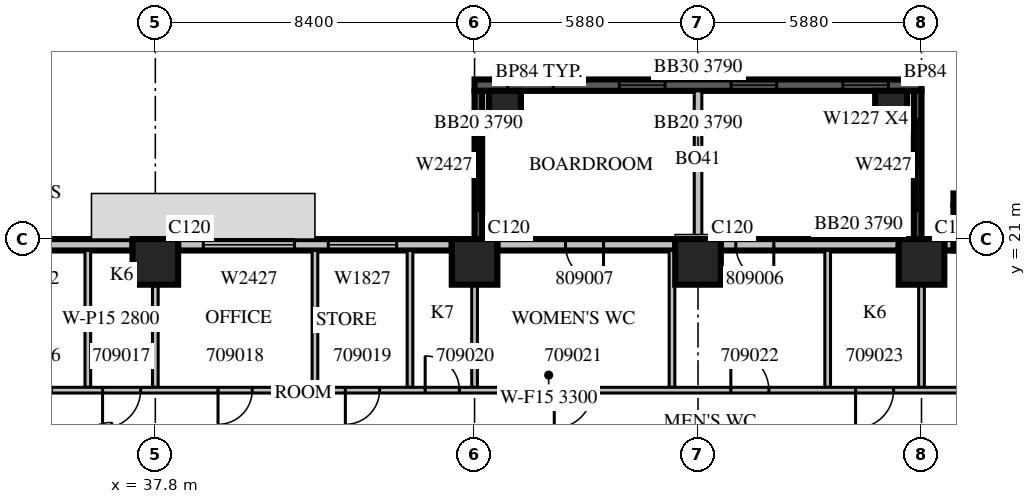
"""IFC4 building model, lengths in metres.
Left out: names, types, materials, properties, quantities, classifications, styles, units other than length and angle.
Written with IfcOpenShell. Run it as: python <this file> out.ifc"""

import sys

from ifc_helpers import new_model, si_unit, direction, frame, frame_2d, origin, origin_2d, place, context, subcontext, project, spatial, rectangle, extrude, source, transform, mapped, element, fill, save


model = new_model("IFC4")
c1 = context("Model", 3, precision=1e-05, world=origin(), true_north=direction((0.0, 1.0)))
c2 = subcontext(c1, "Body", "Model", "MODEL_VIEW")
j1 = project(units=[si_unit("LENGTHUNIT", "METRE"), si_unit("PLANEANGLEUNIT", "RADIAN")], contexts=[c1])
p1 = place(None, origin())
s1 = spatial("IfcSite", under=j1, at=p1, CompositionType="ELEMENT")
p2 = place(p1, origin())
s2 = spatial("IfcBuilding", under=s1, at=p2, CompositionType="ELEMENT")
p3 = place(p2, frame((0.0, 0.0, 48.9)))
s3 = spatial("IfcBuildingStorey", under=s2, at=p3, CompositionType="ELEMENT", Elevation=48.9)
m1 = source(origin(), c2, "Body", "SweptSolid", [
    extrude(rectangle(XDim=1.2, YDim=1.2, at=origin_2d()), origin(), (0.0, 0.0, 1.0), 4.2),
])
for number, where, z_axis, x_axis in (
    (1, (37.8, 20.4, 0.0), (0.0, 0.0, 1.0), (1.0, 0.0, 0.0)),
    (2, (46.2, 20.4, 0.0), (0.0, 0.0, 1.0), (1.0, 0.0, 0.0)),
    (3, (52.08, 20.4, 0.0), (0.0, 0.0, 1.0), (1.0, 0.0, 0.0)),
    (4, (57.96, 20.4, 0.0), (0.0, 0.0, 1.0), (1.0, 0.0, 0.0)),
):
    element("IfcColumn", number, at=place(p3, frame(where, z_axis=z_axis, x_axis=x_axis)), inside=s3, PredefinedType="COLUMN", context=c2, shape_type="MappedRepresentation", body=[
        mapped(m1, transform((0.0, 0.0, 0.0), scale=1.0)),
    ])
p4 = place(p3, frame((47.0, 24.48, -0.4), z_axis=(0.0, 0.0, 1.0), x_axis=(1.0, 0.0, 0.0)))
e5 = element("IfcColumn", 5, at=p4, inside=s3, PredefinedType="COLUMN", context=c2, shape_type="SweptSolid", body=[
    extrude(rectangle(XDim=0.84, YDim=0.84, at=origin_2d()), origin(), (0.0, 0.0, 1.0), 4.6),
])
m2 = source(origin(), c2, "Body", "SweptSolid", [
    extrude(rectangle(XDim=0.84, YDim=0.84, at=origin_2d()), origin(), (0.0, 0.0, 1.0), 4.6),
])
p5 = place(p3, frame((57.16, 24.48, -0.4), z_axis=(0.0, 0.0, 1.0), x_axis=(1.0, 0.0, 0.0)))
e6 = element("IfcColumn", 6, at=p5, inside=s3, PredefinedType="COLUMN", context=c2, shape_type="MappedRepresentation", body=[
    mapped(m2, transform((0.0, 0.0, 0.0), scale=1.0)),
])
m3 = source(origin(), c2, "Body", "SweptSolid", [
    extrude(rectangle(XDim=4.2, YDim=0.3, at=frame_2d((2.1, 0.0))), origin(), (0.0, 0.0, 1.0), 3.8),
])
p6 = place(p3, frame((63.0, 22.05, 0.0), z_axis=(0.0, 0.0, 1.0), x_axis=(-1.0, 0.0, 0.0)))
e7 = element("IfcWall", 7, at=p6, inside=s3, PredefinedType="STANDARD", context=c2, shape_type="MappedRepresentation", body=[
    mapped(m3, transform((0.0, 0.0, 0.0), scale=1.0)),
])
m4 = source(origin(), c2, "Body", "SweptSolid", [
    extrude(rectangle(XDim=3.6, YDim=2.7, at=frame_2d((1.8, 1.35))), frame((0.0, 0.16, 0.0), z_axis=(0.0, -1.0, 0.0), x_axis=(1.0, 0.0, 0.0)), (0.0, 0.0, 1.0), 0.32),
])
p7 = place(p6, frame((0.3, 0.0, 0.6)))
e8 = element("IfcOpeningElement", 8, at=p7, cuts=e7, PredefinedType="OPENING", context=c2, shape_type="MappedRepresentation", body=[
    mapped(m4, transform((0.0, 0.0, 0.0), scale=1.0)),
])
m5 = source(origin(), c2, "Body", "SweptSolid", [
    extrude(rectangle(XDim=1.2, YDim=0.3, at=frame_2d((0.6, 0.0))), origin(), (0.0, 0.0, 1.0), 3.8),
])
p8 = place(p3, frame((58.95, 20.7, 0.0), z_axis=(0.0, 0.0, 1.0), x_axis=(0.0, 1.0, 0.0)))
e9 = element("IfcWall", 9, at=p8, inside=s3, PredefinedType="STANDARD", context=c2, shape_type="MappedRepresentation", body=[
    mapped(m5, transform((0.0, 0.0, 0.0), scale=1.0)),
])
m6 = source(origin(), c2, "Body", "SweptSolid", [
    extrude(rectangle(XDim=0.24, YDim=0.3, at=frame_2d((0.12, 0.0))), origin(), (0.0, 0.0, 1.0), 3.8),
])
p9 = place(p3, frame((58.8, 20.85, 0.0), z_axis=(0.0, 0.0, 1.0), x_axis=(-1.0, 0.0, 0.0)))
e10 = element("IfcWall", 10, at=p9, inside=s3, PredefinedType="STANDARD", context=c2, shape_type="MappedRepresentation", body=[
    mapped(m6, transform((0.0, 0.0, 0.0), scale=1.0)),
])
m7 = source(origin(), c2, "Body", "SweptSolid", [
    extrude(rectangle(XDim=4.68, YDim=0.3, at=frame_2d((2.34, 0.0))), origin(), (0.0, 0.0, 1.0), 3.8),
])
p10 = place(p3, frame((57.36, 20.85, 0.0), z_axis=(0.0, 0.0, 1.0), x_axis=(-1.0, 0.0, 0.0)))
e11 = element("IfcWall", 11, at=p10, inside=s3, PredefinedType="STANDARD", context=c2, shape_type="MappedRepresentation", body=[
    mapped(m7, transform((0.0, 0.0, 0.0), scale=1.0)),
])
m8 = source(origin(), c2, "Body", "SweptSolid", [
    extrude(rectangle(XDim=1.0, YDim=2.1, at=frame_2d((0.5, 1.05))), frame((0.0, 0.16, 0.0), z_axis=(0.0, -1.0, 0.0), x_axis=(1.0, 0.0, 0.0)), (0.0, 0.0, 1.0), 0.32),
])
p11 = place(p10, frame((3.287, 0.0, 0.0)))
e12 = element("IfcOpeningElement", 12, at=p11, cuts=e11, PredefinedType="OPENING", context=c2, shape_type="MappedRepresentation", body=[
    mapped(m8, transform((0.0, 0.0, 0.0), scale=1.0)),
])
p12 = place(p3, frame((51.48, 20.85, 0.0), z_axis=(0.0, 0.0, 1.0), x_axis=(-1.0, 0.0, 0.0)))
e13 = element("IfcWall", 13, at=p12, inside=s3, PredefinedType="STANDARD", context=c2, shape_type="MappedRepresentation", body=[
    mapped(m7, transform((0.0, 0.0, 0.0), scale=1.0)),
])
p13 = place(p12, frame((1.887, 0.0, 0.0)))
e14 = element("IfcOpeningElement", 14, at=p13, cuts=e13, PredefinedType="OPENING", context=c2, shape_type="MappedRepresentation", body=[
    mapped(m8, transform((0.0, 0.0, 0.0), scale=1.0)),
])
m9 = source(origin(), c2, "Body", "SweptSolid", [
    extrude(rectangle(XDim=7.2, YDim=0.3, at=frame_2d((3.6, 0.0))), origin(), (0.0, 0.0, 1.0), 3.8),
])
p14 = place(p3, frame((45.6, 20.85, 0.0), z_axis=(0.0, 0.0, 1.0), x_axis=(-1.0, 0.0, 0.0)))
e15 = element("IfcWall", 15, at=p14, inside=s3, PredefinedType="STANDARD", context=c2, shape_type="MappedRepresentation", body=[
    mapped(m9, transform((0.0, 0.0, 0.0), scale=1.0)),
])
m10 = source(origin(), c2, "Body", "SweptSolid", [
    extrude(rectangle(XDim=1.8, YDim=2.7, at=frame_2d((0.9, 1.35))), frame((0.0, 0.16, 0.0), z_axis=(0.0, -1.0, 0.0), x_axis=(1.0, 0.0, 0.0)), (0.0, 0.0, 1.0), 0.32),
])
p15 = place(p14, frame((1.45, 0.0, 0.6)))
e16 = element("IfcOpeningElement", 16, at=p15, cuts=e15, PredefinedType="OPENING", context=c2, shape_type="MappedRepresentation", body=[
    mapped(m10, transform((0.0, 0.0, 0.0), scale=1.0)),
])
m11 = source(origin(), c2, "Body", "SweptSolid", [
    extrude(rectangle(XDim=2.4, YDim=2.7, at=frame_2d((1.2, 1.35))), frame((0.0, 0.16, 0.0), z_axis=(0.0, -1.0, 0.0), x_axis=(1.0, 0.0, 0.0)), (0.0, 0.0, 1.0), 0.32),
])
p16 = place(p14, frame((4.138, 0.0, 0.6)))
e17 = element("IfcOpeningElement", 17, at=p16, cuts=e15, PredefinedType="OPENING", context=c2, shape_type="MappedRepresentation", body=[
    mapped(m11, transform((0.0, 0.0, 0.0), scale=1.0)),
])
m12 = source(origin(), c2, "Body", "SweptSolid", [
    extrude(rectangle(XDim=7.2, YDim=0.3, at=frame_2d((3.6, 0.0))), origin(), (0.0, 0.0, 1.0), 3.3),
])
p17 = place(p3, frame((37.2, 20.85, 0.0), z_axis=(0.0, 0.0, 1.0), x_axis=(-1.0, 0.0, 0.0)))
e18 = element("IfcWall", 18, at=p17, inside=s3, PredefinedType="STANDARD", context=c2, shape_type="MappedRepresentation", body=[
    mapped(m12, transform((0.0, 0.0, 0.0), scale=1.0)),
])
m13 = source(origin(), c2, "Body", "SweptSolid", [
    extrude(rectangle(XDim=1.2, YDim=2.7, at=frame_2d((0.6, 1.35))), frame((0.0, 0.16, 0.0), z_axis=(0.0, -1.0, 0.0), x_axis=(1.0, 0.0, 0.0)), (0.0, 0.0, 1.0), 0.32),
])
p18 = place(p17, frame((2.466, 0.0, 0.6)))
e19 = element("IfcOpeningElement", 19, at=p18, cuts=e18, PredefinedType="OPENING", context=c2, shape_type="MappedRepresentation", body=[
    mapped(m13, transform((0.0, 0.0, 0.0), scale=1.0)),
])
p19 = place(p17, frame((4.441, 0.0, 0.6)))
e20 = element("IfcOpeningElement", 20, at=p19, cuts=e18, PredefinedType="OPENING", context=c2, shape_type="MappedRepresentation", body=[
    mapped(m13, transform((0.0, 0.0, 0.0), scale=1.0)),
])
p20 = place(p3, frame((57.96, 25.05, 0.0), z_axis=(0.0, 0.0, 1.0), x_axis=(-1.0, 0.0, 0.0)))
e21 = element("IfcWall", 21, at=p20, inside=s3, PredefinedType="SOLIDWALL", context=c2, shape_type="SweptSolid", body=[
    extrude(rectangle(XDim=11.76, YDim=0.3, at=frame_2d((5.88, 0.0))), origin(), (0.0, 0.0, 1.0), 3.79),
])
p21 = place(p20, frame((0.87, 0.0, 0.6)))
e22 = element("IfcOpeningElement", 22, at=p21, cuts=e21, PredefinedType="OPENING", context=c2, shape_type="MappedRepresentation", body=[
    mapped(m13, transform((0.0, 0.0, 0.0), scale=1.0)),
])
p22 = place(p20, frame((3.81, 0.0, 0.6)))
e23 = element("IfcOpeningElement", 23, at=p22, cuts=e21, PredefinedType="OPENING", context=c2, shape_type="MappedRepresentation", body=[
    mapped(m13, transform((0.0, 0.0, 0.0), scale=1.0)),
])
p23 = place(p20, frame((6.75, 0.0, 0.6)))
e24 = element("IfcOpeningElement", 24, at=p23, cuts=e21, PredefinedType="OPENING", context=c2, shape_type="MappedRepresentation", body=[
    mapped(m13, transform((0.0, 0.0, 0.0), scale=1.0)),
])
p24 = place(p20, frame((9.69, 0.0, 0.6)))
e25 = element("IfcOpeningElement", 25, at=p24, cuts=e21, PredefinedType="OPENING", context=c2, shape_type="MappedRepresentation", body=[
    mapped(m13, transform((0.0, 0.0, 0.0), scale=1.0)),
])
p25 = place(p3, frame((52.08, 21.0, 0.0), z_axis=(0.0, 0.0, 1.0), x_axis=(0.0, 1.0, 0.0)))
e26 = element("IfcWall", 26, at=p25, inside=s3, PredefinedType="SOLIDWALL", context=c2, shape_type="SweptSolid", body=[
    extrude(rectangle(XDim=3.9, YDim=0.2, at=frame_2d((1.95, 0.0))), origin(), (0.0, 0.0, 1.0), 3.79),
])
m14 = source(origin(), c2, "Body", "SweptSolid", [
    extrude(rectangle(XDim=3.9, YDim=0.2, at=frame_2d((1.95, 0.0))), origin(), (0.0, 0.0, 1.0), 3.79),
])
p26 = place(p3, frame((57.86, 21.0, 0.0), z_axis=(0.0, 0.0, 1.0), x_axis=(0.0, 1.0, 0.0)))
e27 = element("IfcWall", 27, at=p26, inside=s3, PredefinedType="SOLIDWALL", context=c2, shape_type="MappedRepresentation", body=[
    mapped(m14, transform((0.0, 0.0, 0.0), scale=1.0)),
])
m15 = source(origin(), c2, "Body", "SweptSolid", [
    extrude(rectangle(XDim=2.4, YDim=2.7, at=frame_2d((1.2, 1.35))), frame((0.0, 0.11, 0.0), z_axis=(0.0, -1.0, 0.0), x_axis=(1.0, 0.0, 0.0)), (0.0, 0.0, 1.0), 0.22),
])
p27 = place(p26, frame((0.75, 0.0, 0.6)))
e28 = element("IfcOpeningElement", 28, at=p27, cuts=e27, PredefinedType="OPENING", context=c2, shape_type="MappedRepresentation", body=[
    mapped(m15, transform((0.0, 0.0, 0.0), scale=1.0)),
])
p28 = place(p3, frame((46.3, 21.0, 0.0), z_axis=(0.0, 0.0, 1.0), x_axis=(0.0, 1.0, 0.0)))
e29 = element("IfcWall", 29, at=p28, inside=s3, PredefinedType="SOLIDWALL", context=c2, shape_type="MappedRepresentation", body=[
    mapped(m14, transform((0.0, 0.0, 0.0), scale=1.0)),
])
p29 = place(p28, frame((0.75, 0.0, 0.6)))
e30 = element("IfcOpeningElement", 30, at=p29, cuts=e29, PredefinedType="OPENING", context=c2, shape_type="MappedRepresentation", body=[
    mapped(m15, transform((0.0, 0.0, 0.0), scale=1.0)),
])
m16 = source(origin(), c2, "Body", "SweptSolid", [
    extrude(rectangle(XDim=3.6, YDim=0.15, at=frame_2d((1.8, 0.0))), origin(), (0.0, 0.0, 1.0), 2.8),
])
p30 = place(p3, frame((36.024, 20.7, 0.0), z_axis=(0.0, 0.0, 1.0), x_axis=(0.0, -1.0, 0.0)))
e31 = element("IfcWall", 31, at=p30, inside=s3, PredefinedType="PARTITIONING", context=c2, shape_type="MappedRepresentation", body=[
    mapped(m16, transform((0.0, 0.0, 0.0), scale=1.0)),
])
m17 = source(origin(), c2, "Body", "SweptSolid", [
    extrude(rectangle(XDim=3.6, YDim=0.15, at=frame_2d((1.8, 0.0))), origin(), (0.0, 0.0, 1.0), 3.8),
])
for number, where, z_axis, x_axis in (
    (32, (44.501, 20.7, 0.0), (0.0, 0.0, 1.0), (0.0, -1.0, 0.0)),
    (33, (51.395, 20.7, 0.0), (0.0, 0.0, 1.0), (0.0, -1.0, 0.0)),
    (34, (55.491, 20.7, 0.0), (0.0, 0.0, 1.0), (0.0, -1.0, 0.0)),
):
    element("IfcWall", number, at=place(p3, frame(where, z_axis=z_axis, x_axis=x_axis)), inside=s3, PredefinedType="PARTITIONING", context=c2, shape_type="MappedRepresentation", body=[
        mapped(m17, transform((0.0, 0.0, 0.0), scale=1.0)),
    ])
m18 = source(origin(), c2, "Body", "SweptSolid", [
    extrude(rectangle(XDim=2.701, YDim=0.15, at=frame_2d((1.351, 0.0))), origin(), (0.0, 0.0, 1.0), 3.8),
])
p31 = place(p3, frame((37.8, 17.1, 0.0), z_axis=(0.0, 0.0, 1.0), x_axis=(0.0, 1.0, 0.0)))
e35 = element("IfcWall", 35, at=p31, inside=s3, PredefinedType="PARTITIONING", context=c2, shape_type="MappedRepresentation", body=[
    mapped(m18, transform((0.0, 0.0, 0.0), scale=1.0)),
])
p32 = place(p3, frame((42.0, 17.1, 0.0), z_axis=(0.0, 0.0, 1.0), x_axis=(0.0, 1.0, 0.0)))
e36 = element("IfcWall", 36, at=p32, inside=s3, PredefinedType="PARTITIONING", context=c2, shape_type="MappedRepresentation", body=[
    mapped(m17, transform((0.0, 0.0, 0.0), scale=1.0)),
])
for number, where, z_axis, x_axis in (
    (37, (46.2, 17.1, 0.0), (0.0, 0.0, 1.0), (0.0, 1.0, 0.0)),
    (38, (57.96, 17.1, 0.0), (0.0, 0.0, 1.0), (0.0, 1.0, 0.0)),
):
    element("IfcWall", number, at=place(p3, frame(where, z_axis=z_axis, x_axis=x_axis)), inside=s3, PredefinedType="PARTITIONING", context=c2, shape_type="MappedRepresentation", body=[
        mapped(m18, transform((0.0, 0.0, 0.0), scale=1.0)),
    ])
m19 = source(origin(), c2, "Body", "SweptSolid", [
    extrude(rectangle(XDim=37.5, YDim=0.15, at=frame_2d((18.75, 0.0))), origin(), (0.0, 0.0, 1.0), 3.3),
])
p33 = place(p3, frame((29.4, 17.025, 0.0), z_axis=(0.0, 0.0, 1.0), x_axis=(1.0, 0.0, 0.0)))
e39 = element("IfcWall", 39, at=p33, inside=s3, PredefinedType="PARTITIONING", context=c2, shape_type="MappedRepresentation", body=[
    mapped(m19, transform((0.0, 0.0, 0.0), scale=1.0)),
])
m20 = source(origin(), c2, "Body", "SweptSolid", [
    extrude(rectangle(XDim=1.0, YDim=2.1, at=frame_2d((0.5, 1.05))), frame((0.0, 0.085, 0.0), z_axis=(0.0, -1.0, 0.0), x_axis=(1.0, 0.0, 0.0)), (0.0, 0.0, 1.0), 0.17),
])
p34 = place(p33, frame((1.357, 0.0, 0.0)))
e40 = element("IfcOpeningElement", 40, at=p34, cuts=e39, PredefinedType="OPENING", context=c2, shape_type="MappedRepresentation", body=[
    mapped(m20, transform((0.0, 0.0, 0.0), scale=1.0)),
])
p35 = place(p33, frame((4.669, 0.0, 0.0)))
e41 = element("IfcOpeningElement", 41, at=p35, cuts=e39, PredefinedType="OPENING", context=c2, shape_type="MappedRepresentation", body=[
    mapped(m20, transform((0.0, 0.0, 0.0), scale=1.0)),
])
p36 = place(p33, frame((7.012, 0.0, 0.0)))
e42 = element("IfcOpeningElement", 42, at=p36, cuts=e39, PredefinedType="OPENING", context=c2, shape_type="MappedRepresentation", body=[
    mapped(m20, transform((0.0, 0.0, 0.0), scale=1.0)),
])
m21 = source(origin(), c2, "Body", "SweptSolid", [
    extrude(rectangle(XDim=0.9, YDim=2.1, at=frame_2d((0.45, 1.05))), frame((0.0, 0.085, 0.0), z_axis=(0.0, -1.0, 0.0), x_axis=(1.0, 0.0, 0.0)), (0.0, 0.0, 1.0), 0.17),
])
p37 = place(p33, frame((10.05, 0.0, 0.0)))
e43 = element("IfcOpeningElement", 43, at=p37, cuts=e39, PredefinedType="OPENING", context=c2, shape_type="MappedRepresentation", body=[
    mapped(m21, transform((0.0, 0.0, 0.0), scale=1.0)),
])
p38 = place(p33, frame((13.401, 0.0, 0.0)))
e44 = element("IfcOpeningElement", 44, at=p38, cuts=e39, PredefinedType="OPENING", context=c2, shape_type="MappedRepresentation", body=[
    mapped(m21, transform((0.0, 0.0, 0.0), scale=1.0)),
])
p39 = place(p33, frame((15.501, 0.0, 0.0)))
e45 = element("IfcOpeningElement", 45, at=p39, cuts=e39, PredefinedType="OPENING", context=c2, shape_type="MappedRepresentation", body=[
    mapped(m21, transform((0.0, 0.0, 0.0), scale=1.0)),
])
p40 = place(p33, frame((18.898, 0.0, 0.0)))
e46 = element("IfcOpeningElement", 46, at=p40, cuts=e39, PredefinedType="OPENING", context=c2, shape_type="MappedRepresentation", body=[
    mapped(m20, transform((0.0, 0.0, 0.0), scale=1.0)),
])
p41 = place(p33, frame((23.543, 0.0, 0.0)))
e47 = element("IfcOpeningElement", 47, at=p41, cuts=e39, PredefinedType="OPENING", context=c2, shape_type="MappedRepresentation", body=[
    mapped(m20, transform((0.0, 0.0, 0.0), scale=1.0)),
])
p42 = place(p33, frame((26.826, 0.0, 0.0)))
e48 = element("IfcOpeningElement", 48, at=p42, cuts=e39, PredefinedType="OPENING", context=c2, shape_type="MappedRepresentation", body=[
    mapped(m20, transform((0.0, 0.0, 0.0), scale=1.0)),
])
p43 = place(p33, frame((30.364, 0.0, 0.0)))
e49 = element("IfcOpeningElement", 49, at=p43, cuts=e39, PredefinedType="OPENING", context=c2, shape_type="MappedRepresentation", body=[
    mapped(m21, transform((0.0, 0.0, 0.0), scale=1.0)),
])
p44 = place(p33, frame((34.871, 0.0, 0.0)))
e50 = element("IfcOpeningElement", 50, at=p44, cuts=e39, PredefinedType="OPENING", context=c2, shape_type="MappedRepresentation", body=[
    mapped(m21, transform((0.0, 0.0, 0.0), scale=1.0)),
])
m22 = source(origin(), c2, "Body", "SweptSolid", [
    extrude(rectangle(XDim=1.8, YDim=2.7, at=frame_2d((0.9, 1.35))), frame((0.0, 0.03, 0.0), z_axis=(0.0, -1.0, 0.0), x_axis=(1.0, 0.0, 0.0)), (0.0, 0.0, 1.0), 0.06),
])
p45 = place(p15, origin())
e51 = element("IfcWindow", 51, at=p45, inside=s3, PartitioningType="SINGLE_PANEL", PredefinedType="WINDOW", context=c2, shape_type="MappedRepresentation", body=[
    mapped(m22, transform((0.0, 0.0, 0.0), scale=1.0)),
])
fill(e16, e51)
m23 = source(origin(), c2, "Body", "SweptSolid", [
    extrude(rectangle(XDim=2.4, YDim=2.7, at=frame_2d((1.2, 1.35))), frame((0.0, 0.03, 0.0), z_axis=(0.0, -1.0, 0.0), x_axis=(1.0, 0.0, 0.0)), (0.0, 0.0, 1.0), 0.06),
])
p46 = place(p16, origin())
e52 = element("IfcWindow", 52, at=p46, inside=s3, PartitioningType="SINGLE_PANEL", PredefinedType="WINDOW", context=c2, shape_type="MappedRepresentation", body=[
    mapped(m23, transform((0.0, 0.0, 0.0), scale=1.0)),
])
fill(e17, e52)
m24 = source(origin(), c2, "Body", "SweptSolid", [
    extrude(rectangle(XDim=1.2, YDim=2.7, at=frame_2d((0.6, 1.35))), frame((0.0, 0.03, 0.0), z_axis=(0.0, -1.0, 0.0), x_axis=(1.0, 0.0, 0.0)), (0.0, 0.0, 1.0), 0.06),
])
p47 = place(p21, origin())
e53 = element("IfcWindow", 53, at=p47, inside=s3, PartitioningType="SINGLE_PANEL", PredefinedType="WINDOW", context=c2, shape_type="MappedRepresentation", body=[
    mapped(m24, transform((0.0, 0.0, 0.0), scale=1.0)),
])
fill(e22, e53)
p48 = place(p22, origin())
e54 = element("IfcWindow", 54, at=p48, inside=s3, PartitioningType="SINGLE_PANEL", PredefinedType="WINDOW", context=c2, shape_type="MappedRepresentation", body=[
    mapped(m24, transform((0.0, 0.0, 0.0), scale=1.0)),
])
fill(e23, e54)
p49 = place(p23, origin())
e55 = element("IfcWindow", 55, at=p49, inside=s3, PartitioningType="SINGLE_PANEL", PredefinedType="WINDOW", context=c2, shape_type="MappedRepresentation", body=[
    mapped(m24, transform((0.0, 0.0, 0.0), scale=1.0)),
])
fill(e24, e55)
p50 = place(p24, origin())
e56 = element("IfcWindow", 56, at=p50, inside=s3, PartitioningType="SINGLE_PANEL", PredefinedType="WINDOW", context=c2, shape_type="MappedRepresentation", body=[
    mapped(m24, transform((0.0, 0.0, 0.0), scale=1.0)),
])
fill(e25, e56)
p51 = place(p27, origin())
e57 = element("IfcWindow", 57, at=p51, inside=s3, PartitioningType="SINGLE_PANEL", PredefinedType="WINDOW", context=c2, shape_type="MappedRepresentation", body=[
    mapped(m23, transform((0.0, 0.0, 0.0), scale=1.0)),
])
fill(e28, e57)
p52 = place(p29, origin())
e58 = element("IfcWindow", 58, at=p52, inside=s3, PartitioningType="SINGLE_PANEL", PredefinedType="WINDOW", context=c2, shape_type="MappedRepresentation", body=[
    mapped(m23, transform((0.0, 0.0, 0.0), scale=1.0)),
])
fill(e30, e58)
m25 = source(origin(), c2, "Body", "SweptSolid", [
    extrude(rectangle(XDim=1.0, YDim=2.1, at=frame_2d((0.5, 1.05))), frame((0.0, 0.025, 0.0), z_axis=(0.0, -1.0, 0.0), x_axis=(1.0, 0.0, 0.0)), (0.0, 0.0, 1.0), 0.05),
])
p53 = place(p36, origin())
e59 = element("IfcDoor", 59, at=p53, inside=s3, OperationType="SINGLE_SWING_RIGHT", PredefinedType="DOOR", context=c2, shape_type="MappedRepresentation", body=[
    mapped(m25, transform((0.0, 0.0, 0.0), scale=1.0)),
])
fill(e42, e59)
m26 = source(origin(), c2, "Body", "SweptSolid", [
    extrude(rectangle(XDim=0.9, YDim=2.1, at=frame_2d((0.45, 1.05))), frame((0.0, 0.025, 0.0), z_axis=(0.0, -1.0, 0.0), x_axis=(1.0, 0.0, 0.0)), (0.0, 0.0, 1.0), 0.05),
])
p54 = place(p37, origin())
e60 = element("IfcDoor", 60, at=p54, inside=s3, OperationType="SINGLE_SWING_RIGHT", PredefinedType="DOOR", context=c2, shape_type="MappedRepresentation", body=[
    mapped(m26, transform((0.0, 0.0, 0.0), scale=1.0)),
])
fill(e43, e60)
p55 = place(p38, origin())
e61 = element("IfcDoor", 61, at=p55, inside=s3, OperationType="SINGLE_SWING_RIGHT", PredefinedType="DOOR", context=c2, shape_type="MappedRepresentation", body=[
    mapped(m26, transform((0.0, 0.0, 0.0), scale=1.0)),
])
fill(e44, e61)
p56 = place(p39, origin())
e62 = element("IfcDoor", 62, at=p56, inside=s3, OperationType="SINGLE_SWING_LEFT", PredefinedType="DOOR", context=c2, shape_type="MappedRepresentation", body=[
    mapped(m26, transform((0.0, 0.0, 0.0), scale=1.0)),
])
fill(e45, e62)
p57 = place(p40, origin())
e63 = element("IfcDoor", 63, at=p57, inside=s3, OperationType="SINGLE_SWING_RIGHT", PredefinedType="DOOR", context=c2, shape_type="MappedRepresentation", body=[
    mapped(m25, transform((0.0, 0.0, 0.0), scale=1.0)),
])
fill(e46, e63)
p58 = place(p41, origin())
e64 = element("IfcDoor", 64, at=p58, inside=s3, OperationType="SINGLE_SWING_LEFT", PredefinedType="DOOR", context=c2, shape_type="MappedRepresentation", body=[
    mapped(m25, transform((0.0, 0.0, 0.0), scale=1.0)),
])
fill(e47, e64)
p59 = place(p42, origin())
e65 = element("IfcDoor", 65, at=p59, inside=s3, OperationType="SINGLE_SWING_RIGHT", PredefinedType="DOOR", context=c2, shape_type="MappedRepresentation", body=[
    mapped(m25, transform((0.0, 0.0, 0.0), scale=1.0)),
])
fill(e48, e65)
p60 = place(p11, origin())
e66 = element("IfcDoor", 66, at=p60, inside=s3, OperationType="SINGLE_SWING_LEFT", PredefinedType="DOOR", context=c2, shape_type="MappedRepresentation", body=[
    mapped(m25, transform((0.0, 0.0, 0.0), scale=1.0)),
])
fill(e12, e66)
p61 = place(p13, origin())
e67 = element("IfcDoor", 67, at=p61, inside=s3, OperationType="SINGLE_SWING_LEFT", PredefinedType="DOOR", context=c2, shape_type="MappedRepresentation", body=[
    mapped(m25, transform((0.0, 0.0, 0.0), scale=1.0)),
])
fill(e14, e67)
save(model, sys.argv[1])
